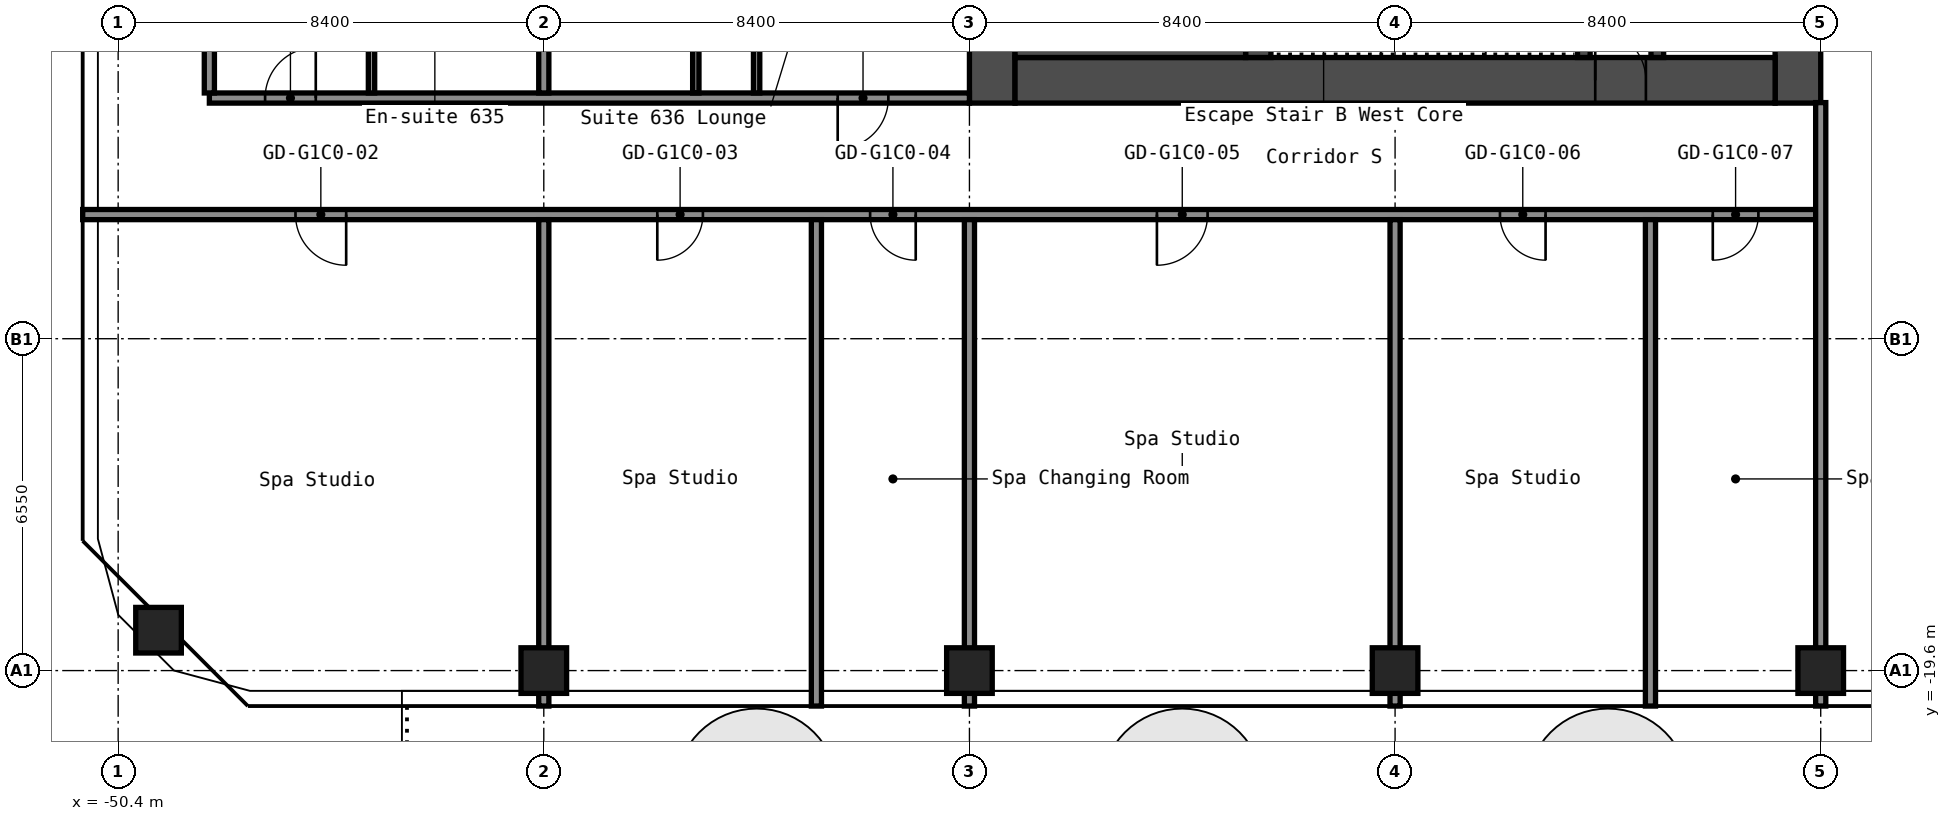
"""IFC4 building model, lengths in metres.
Left out: names, types, materials, properties, quantities, classifications, styles, units other than length and angle.
Written with IfcOpenShell. Run it as: python <this file> out.ifc"""

import sys

from ifc_helpers import new_model, si_unit, direction, frame, frame_2d, origin, origin_2d, place, context, subcontext, project, spatial, rectangle, hollow_rectangle, extrude, element, fill, save


model = new_model("IFC4")
c1 = context("Model", 3, precision=1e-05, world=origin(), true_north=direction((0.0, 1.0)))
c2 = subcontext(c1, "Body", "Model", "MODEL_VIEW")
j1 = project(units=[si_unit("LENGTHUNIT", "METRE"), si_unit("PLANEANGLEUNIT", "RADIAN")], contexts=[c1])
p1 = place(None, origin())
s1 = spatial("IfcSite", under=j1, at=p1, CompositionType="ELEMENT")
p2 = place(p1, origin())
s2 = spatial("IfcBuilding", under=s1, at=p2, CompositionType="ELEMENT")
p3 = place(p2, frame((0.0, 0.0, 26.2)))
s3 = spatial("IfcBuildingStorey", under=s2, at=p3, CompositionType="ELEMENT", Elevation=26.2)
for number, where, z_axis, x_axis in (
    (1, (-49.603, -18.803, 0.0), (0.0, 0.0, 1.0), (1.0, 0.0, 0.0)),
    (2, (-42.0, -19.6, 0.0), (0.0, 0.0, 1.0), (1.0, 0.0, 0.0)),
    (3, (-33.6, -19.6, 0.0), (0.0, 0.0, 1.0), (1.0, 0.0, 0.0)),
    (4, (-25.2, -19.6, 0.0), (0.0, 0.0, 1.0), (1.0, 0.0, 0.0)),
    (5, (-16.8, -19.6, 0.0), (0.0, 0.0, 1.0), (1.0, 0.0, 0.0)),
):
    element("IfcColumn", number, at=place(p3, frame(where, z_axis=z_axis, x_axis=x_axis)), inside=s3, PredefinedType="COLUMN", context=c2, shape_type="SweptSolid", body=[
        extrude(hollow_rectangle(XDim=0.9, YDim=0.9, WallThickness=0.036, at=origin_2d()), origin(), (0.0, 0.0, 1.0), 2.8),
    ])
p4 = place(p3, frame((-17.25, -8.4, 0.0), z_axis=(0.0, 0.0, 1.0), x_axis=(0.0, 1.0, 0.0)))
e6 = element("IfcWall", 6, at=p4, inside=s3, PredefinedType="SHEAR", context=c2, shape_type="SweptSolid", body=[
    extrude(rectangle(XDim=16.8, YDim=0.9, at=frame_2d((8.4, 0.0))), origin(), (0.0, 0.0, 1.0), 2.8),
])
p5 = place(p4, frame((12.75, 0.0, 0.0)))
e7 = element("IfcOpeningElement", 7, at=p5, cuts=e6, PredefinedType="OPENING", context=c2, shape_type="SweptSolid", body=[
    extrude(rectangle(XDim=1.2, YDim=2.1, at=frame_2d((0.6, 1.05))), frame((0.0, 0.46, 0.0), z_axis=(0.0, -1.0, 0.0), x_axis=(1.0, 0.0, 0.0)), (0.0, 0.0, 1.0), 0.92),
])
p6 = place(p4, frame((2.85, 0.0, 0.0)))
e8 = element("IfcOpeningElement", 8, at=p6, cuts=e6, PredefinedType="OPENING", context=c2, shape_type="SweptSolid", body=[
    extrude(rectangle(XDim=1.2, YDim=2.1, at=frame_2d((0.6, 1.05))), frame((0.0, 0.46, 0.0), z_axis=(0.0, -1.0, 0.0), x_axis=(1.0, 0.0, 0.0)), (0.0, 0.0, 1.0), 0.92),
])
p7 = place(p3, frame((-33.15, -8.4, 0.0), z_axis=(0.0, 0.0, 1.0), x_axis=(0.0, 1.0, 0.0)))
e9 = element("IfcWall", 9, at=p7, inside=s3, PredefinedType="SHEAR", context=c2, shape_type="SweptSolid", body=[
    extrude(rectangle(XDim=16.8, YDim=0.9, at=frame_2d((8.4, 0.0))), origin(), (0.0, 0.0, 1.0), 2.8),
])
p8 = place(p3, frame((-32.7, -7.95, 0.0), z_axis=(0.0, 0.0, 1.0), x_axis=(1.0, 0.0, 0.0)))
e10 = element("IfcWall", 10, at=p8, inside=s3, PredefinedType="SHEAR", context=c2, shape_type="SweptSolid", body=[
    extrude(rectangle(XDim=15.0, YDim=0.9, at=frame_2d((7.5, 0.0))), origin(), (0.0, 0.0, 1.0), 2.8),
])
p9 = place(p8, frame((11.45, 0.0, 0.0)))
e11 = element("IfcOpeningElement", 11, at=p9, cuts=e10, PredefinedType="OPENING", context=c2, shape_type="SweptSolid", body=[
    extrude(rectangle(XDim=1.0, YDim=2.1, at=frame_2d((0.5, 1.05))), frame((0.0, 0.46, 0.0), z_axis=(0.0, -1.0, 0.0), x_axis=(1.0, 0.0, 0.0)), (0.0, 0.0, 1.0), 0.92),
])
p10 = place(p3, frame((-20.025, -7.5, 0.0), z_axis=(0.0, 0.0, 1.0), x_axis=(0.0, 1.0, 0.0)))
e12 = element("IfcWall", 12, at=p10, inside=s3, PredefinedType="SHEAR", context=c2, shape_type="SweptSolid", body=[
    extrude(rectangle(XDim=6.3, YDim=0.25, at=frame_2d((3.15, 0.0))), origin(), (0.0, 0.0, 1.0), 2.8),
])
p11 = place(p10, frame((2.4, 0.0, 0.0)))
e13 = element("IfcOpeningElement", 13, at=p11, cuts=e12, PredefinedType="OPENING", context=c2, shape_type="SweptSolid", body=[
    extrude(rectangle(XDim=1.0, YDim=2.1, at=frame_2d((0.5, 1.05))), frame((0.0, 0.135, 0.0), z_axis=(0.0, -1.0, 0.0), x_axis=(1.0, 0.0, 0.0)), (0.0, 0.0, 1.0), 0.27),
])
p12 = place(p3, frame((-21.475, -7.5, 0.0), z_axis=(0.0, 0.0, 1.0), x_axis=(0.0, 1.0, 0.0)))
e14 = element("IfcWall", 14, at=p12, inside=s3, PredefinedType="SHEAR", context=c2, shape_type="SweptSolid", body=[
    extrude(rectangle(XDim=3.75, YDim=0.25, at=frame_2d((1.875, 0.0))), origin(), (0.0, 0.0, 1.0), 2.8),
])
p13 = place(p12, frame((1.3, 0.0, 0.0)))
e15 = element("IfcOpeningElement", 15, at=p13, cuts=e14, PredefinedType="OPENING", context=c2, shape_type="SweptSolid", body=[
    extrude(rectangle(XDim=1.2, YDim=2.1, at=frame_2d((0.6, 1.05))), frame((0.0, 0.135, 0.0), z_axis=(0.0, -1.0, 0.0), x_axis=(1.0, 0.0, 0.0)), (0.0, 0.0, 1.0), 0.27),
])
p14 = place(p3, frame((-27.9, -7.5, 0.0), z_axis=(0.0, 0.0, 1.0), x_axis=(0.0, 1.0, 0.0)))
e16 = element("IfcWall", 16, at=p14, inside=s3, PredefinedType="SHEAR", context=c2, shape_type="SweptSolid", body=[
    extrude(rectangle(XDim=3.75, YDim=0.5, at=frame_2d((1.875, 0.0))), origin(), (0.0, 0.0, 1.0), 2.8),
])
p15 = place(p3, frame((-32.7, -6.75, 0.0), z_axis=(0.0, 0.0, 1.0), x_axis=(1.0, 0.0, 0.0)))
e17 = element("IfcWall", 17, at=p15, inside=s3, PredefinedType="SHEAR", context=c2, shape_type="SweptSolid", body=[
    extrude(rectangle(XDim=4.55, YDim=1.5, at=frame_2d((2.275, 0.0))), origin(), (0.0, 0.0, 1.0), 2.8),
])
p16 = place(p3, frame((-51.1, -10.6, 0.0), z_axis=(0.0, 0.0, 1.0), x_axis=(1.0, 0.0, 0.0)))
e18 = element("IfcWall", 18, at=p16, inside=s3, PredefinedType="PARTITIONING", context=c2, shape_type="SweptSolid", body=[
    extrude(rectangle(XDim=34.3, YDim=0.2, at=frame_2d((17.15, 0.0))), origin(), (0.0, 0.0, 1.0), 2.8),
])
p17 = place(p16, frame((4.2, 0.0, 0.0)))
e19 = element("IfcOpeningElement", 19, at=p17, cuts=e18, PredefinedType="OPENING", context=c2, shape_type="SweptSolid", body=[
    extrude(rectangle(XDim=1.0, YDim=2.1, at=frame_2d((0.5, 1.05))), frame((0.0, 0.11, 0.0), z_axis=(0.0, -1.0, 0.0), x_axis=(1.0, 0.0, 0.0)), (0.0, 0.0, 1.0), 0.22),
])
p18 = place(p16, frame((11.34, 0.0, 0.0)))
e20 = element("IfcOpeningElement", 20, at=p18, cuts=e18, PredefinedType="OPENING", context=c2, shape_type="SweptSolid", body=[
    extrude(rectangle(XDim=0.9, YDim=2.1, at=frame_2d((0.45, 1.05))), frame((0.0, 0.11, 0.0), z_axis=(0.0, -1.0, 0.0), x_axis=(1.0, 0.0, 0.0)), (0.0, 0.0, 1.0), 0.22),
])
p19 = place(p16, frame((15.54, 0.0, 0.0)))
e21 = element("IfcOpeningElement", 21, at=p19, cuts=e18, PredefinedType="OPENING", context=c2, shape_type="SweptSolid", body=[
    extrude(rectangle(XDim=0.9, YDim=2.1, at=frame_2d((0.45, 1.05))), frame((0.0, 0.11, 0.0), z_axis=(0.0, -1.0, 0.0), x_axis=(1.0, 0.0, 0.0)), (0.0, 0.0, 1.0), 0.22),
])
p20 = place(p16, frame((21.2, 0.0, 0.0)))
e22 = element("IfcOpeningElement", 22, at=p20, cuts=e18, PredefinedType="OPENING", context=c2, shape_type="SweptSolid", body=[
    extrude(rectangle(XDim=1.0, YDim=2.1, at=frame_2d((0.5, 1.05))), frame((0.0, 0.11, 0.0), z_axis=(0.0, -1.0, 0.0), x_axis=(1.0, 0.0, 0.0)), (0.0, 0.0, 1.0), 0.22),
])
p21 = place(p16, frame((27.97, 0.0, 0.0)))
e23 = element("IfcOpeningElement", 23, at=p21, cuts=e18, PredefinedType="OPENING", context=c2, shape_type="SweptSolid", body=[
    extrude(rectangle(XDim=0.9, YDim=2.1, at=frame_2d((0.45, 1.05))), frame((0.0, 0.11, 0.0), z_axis=(0.0, -1.0, 0.0), x_axis=(1.0, 0.0, 0.0)), (0.0, 0.0, 1.0), 0.22),
])
p22 = place(p16, frame((32.17, 0.0, 0.0)))
e24 = element("IfcOpeningElement", 24, at=p22, cuts=e18, PredefinedType="OPENING", context=c2, shape_type="SweptSolid", body=[
    extrude(rectangle(XDim=0.9, YDim=2.1, at=frame_2d((0.45, 1.05))), frame((0.0, 0.11, 0.0), z_axis=(0.0, -1.0, 0.0), x_axis=(1.0, 0.0, 0.0)), (0.0, 0.0, 1.0), 0.22),
])
p23 = place(p3, frame((-48.6, -8.3, 0.0), z_axis=(0.0, 0.0, 1.0), x_axis=(1.0, 0.0, 0.0)))
e25 = element("IfcWall", 25, at=p23, inside=s3, PredefinedType="PARTITIONING", context=c2, shape_type="SweptSolid", body=[
    extrude(rectangle(XDim=15.0, YDim=0.2, at=frame_2d((7.5, 0.0))), origin(), (0.0, 0.0, 1.0), 2.8),
])
p24 = place(p23, frame((1.1, 0.0, 0.0)))
e26 = element("IfcOpeningElement", 26, at=p24, cuts=e25, PredefinedType="OPENING", context=c2, shape_type="SweptSolid", body=[
    extrude(rectangle(XDim=1.0, YDim=2.1, at=frame_2d((0.5, 1.05))), frame((0.0, 0.11, 0.0), z_axis=(0.0, -1.0, 0.0), x_axis=(1.0, 0.0, 0.0)), (0.0, 0.0, 1.0), 0.22),
])
p25 = place(p23, frame((12.4, 0.0, 0.0)))
e27 = element("IfcOpeningElement", 27, at=p25, cuts=e25, PredefinedType="OPENING", context=c2, shape_type="SweptSolid", body=[
    extrude(rectangle(XDim=1.0, YDim=2.1, at=frame_2d((0.5, 1.05))), frame((0.0, 0.11, 0.0), z_axis=(0.0, -1.0, 0.0), x_axis=(1.0, 0.0, 0.0)), (0.0, 0.0, 1.0), 0.22),
])
p26 = place(p3, frame((-48.6, -8.2, 0.0), z_axis=(0.0, 0.0, 1.0), x_axis=(0.0, 1.0, 0.0)))
e28 = element("IfcWall", 28, at=p26, inside=s3, PredefinedType="PARTITIONING", context=c2, shape_type="SweptSolid", body=[
    extrude(rectangle(XDim=16.4, YDim=0.2, at=frame_2d((8.2, 0.0))), origin(), (0.0, 0.0, 1.0), 2.8),
])
p27 = place(p3, frame((-45.4, -8.2, 0.0), z_axis=(0.0, 0.0, 1.0), x_axis=(0.0, 1.0, 0.0)))
e29 = element("IfcWall", 29, at=p27, inside=s3, PredefinedType="PARTITIONING", context=c2, shape_type="SweptSolid", body=[
    extrude(rectangle(XDim=3.3, YDim=0.125, at=frame_2d((1.65, 0.0))), origin(), (0.0, 0.0, 1.0), 2.8),
])
p28 = place(p3, frame((-42.0, -20.3, 0.0), z_axis=(0.0, 0.0, 1.0), x_axis=(0.0, 1.0, 0.0)))
e30 = element("IfcWall", 30, at=p28, inside=s3, PredefinedType="PARTITIONING", context=c2, shape_type="SweptSolid", body=[
    extrude(rectangle(XDim=9.6, YDim=0.2, at=frame_2d((4.8, 0.0))), origin(), (0.0, 0.0, 1.0), 2.8),
])
p29 = place(p3, frame((-42.0, -8.2, 0.0), z_axis=(0.0, 0.0, 1.0), x_axis=(0.0, 1.0, 0.0)))
e31 = element("IfcWall", 31, at=p29, inside=s3, PredefinedType="PARTITIONING", context=c2, shape_type="SweptSolid", body=[
    extrude(rectangle(XDim=16.4, YDim=0.2, at=frame_2d((8.2, 0.0))), origin(), (0.0, 0.0, 1.0), 2.8),
])
p30 = place(p3, frame((-39.0, -8.2, 0.0), z_axis=(0.0, 0.0, 1.0), x_axis=(0.0, 1.0, 0.0)))
e32 = element("IfcWall", 32, at=p30, inside=s3, PredefinedType="PARTITIONING", context=c2, shape_type="SweptSolid", body=[
    extrude(rectangle(XDim=3.1, YDim=0.125, at=frame_2d((1.55, 0.0))), origin(), (0.0, 0.0, 1.0), 2.8),
])
p31 = place(p3, frame((-37.8, -8.2, 0.0), z_axis=(0.0, 0.0, 1.0), x_axis=(0.0, 1.0, 0.0)))
e33 = element("IfcWall", 33, at=p31, inside=s3, PredefinedType="PARTITIONING", context=c2, shape_type="SweptSolid", body=[
    extrude(rectangle(XDim=8.1, YDim=0.125, at=frame_2d((4.05, 0.0))), origin(), (0.0, 0.0, 1.0), 2.8),
])
p32 = place(p31, frame((4.05, 0.0, 0.0)))
e34 = element("IfcOpeningElement", 34, at=p32, cuts=e33, PredefinedType="OPENING", context=c2, shape_type="SweptSolid", body=[
    extrude(rectangle(XDim=0.9, YDim=2.1, at=frame_2d((0.45, 1.05))), frame((0.0, 0.073, 0.0), z_axis=(0.0, -1.0, 0.0), x_axis=(1.0, 0.0, 0.0)), (0.0, 0.0, 1.0), 0.145),
])
for number, where, z_axis, x_axis in (
    (35, (-36.62, -20.3, 0.0), (0.0, 0.0, 1.0), (0.0, 1.0, 0.0)),
    (36, (-33.6, -20.3, 0.0), (0.0, 0.0, 1.0), (0.0, 1.0, 0.0)),
    (37, (-25.2, -20.3, 0.0), (0.0, 0.0, 1.0), (0.0, 1.0, 0.0)),
    (38, (-20.16, -20.3, 0.0), (0.0, 0.0, 1.0), (0.0, 1.0, 0.0)),
):
    element("IfcWall", number, at=place(p3, frame(where, z_axis=z_axis, x_axis=x_axis)), inside=s3, PredefinedType="PARTITIONING", context=c2, shape_type="SweptSolid", body=[
        extrude(rectangle(XDim=9.6, YDim=0.2, at=frame_2d((4.8, 0.0))), origin(), (0.0, 0.0, 1.0), 2.8),
    ])
p33 = place(p3, frame((-16.8, -20.3, 0.0), z_axis=(0.0, 0.0, 1.0), x_axis=(0.0, 1.0, 0.0)))
e39 = element("IfcWall", 39, at=p33, inside=s3, PredefinedType="PARTITIONING", context=c2, shape_type="SweptSolid", body=[
    extrude(rectangle(XDim=11.91, YDim=0.2, at=frame_2d((5.955, 0.0))), origin(), (0.0, 0.0, 1.0), 2.8),
])
p34 = place(p9, origin())
e40 = element("IfcDoor", 40, at=p34, inside=s3, OperationType="SINGLE_SWING_RIGHT", PredefinedType="DOOR", context=c2, shape_type="SweptSolid", body=[
    extrude(rectangle(XDim=1.0, YDim=2.1, at=frame_2d((0.5, 1.05))), frame((0.0, 0.025, 0.0), z_axis=(0.0, -1.0, 0.0), x_axis=(1.0, 0.0, 0.0)), (0.0, 0.0, 1.0), 0.05),
])
fill(e11, e40)
p35 = place(p17, origin())
e41 = element("IfcDoor", 41, at=p35, inside=s3, OperationType="SINGLE_SWING_RIGHT", PredefinedType="DOOR", context=c2, shape_type="SweptSolid", body=[
    extrude(rectangle(XDim=1.0, YDim=2.1, at=frame_2d((0.5, 1.05))), frame((0.0, 0.025, 0.0), z_axis=(0.0, -1.0, 0.0), x_axis=(1.0, 0.0, 0.0)), (0.0, 0.0, 1.0), 0.05),
])
fill(e19, e41)
p36 = place(p18, origin())
e42 = element("IfcDoor", 42, at=p36, inside=s3, OperationType="SINGLE_SWING_LEFT", PredefinedType="DOOR", context=c2, shape_type="SweptSolid", body=[
    extrude(rectangle(XDim=0.9, YDim=2.1, at=frame_2d((0.45, 1.05))), frame((0.0, 0.025, 0.0), z_axis=(0.0, -1.0, 0.0), x_axis=(1.0, 0.0, 0.0)), (0.0, 0.0, 1.0), 0.05),
])
fill(e20, e42)
p37 = place(p19, origin())
e43 = element("IfcDoor", 43, at=p37, inside=s3, OperationType="SINGLE_SWING_RIGHT", PredefinedType="DOOR", context=c2, shape_type="SweptSolid", body=[
    extrude(rectangle(XDim=0.9, YDim=2.1, at=frame_2d((0.45, 1.05))), frame((0.0, 0.025, 0.0), z_axis=(0.0, -1.0, 0.0), x_axis=(1.0, 0.0, 0.0)), (0.0, 0.0, 1.0), 0.05),
])
fill(e21, e43)
p38 = place(p20, origin())
e44 = element("IfcDoor", 44, at=p38, inside=s3, OperationType="SINGLE_SWING_LEFT", PredefinedType="DOOR", context=c2, shape_type="SweptSolid", body=[
    extrude(rectangle(XDim=1.0, YDim=2.1, at=frame_2d((0.5, 1.05))), frame((0.0, 0.025, 0.0), z_axis=(0.0, -1.0, 0.0), x_axis=(1.0, 0.0, 0.0)), (0.0, 0.0, 1.0), 0.05),
])
fill(e22, e44)
p39 = place(p21, origin())
e45 = element("IfcDoor", 45, at=p39, inside=s3, OperationType="SINGLE_SWING_RIGHT", PredefinedType="DOOR", context=c2, shape_type="SweptSolid", body=[
    extrude(rectangle(XDim=0.9, YDim=2.1, at=frame_2d((0.45, 1.05))), frame((0.0, 0.025, 0.0), z_axis=(0.0, -1.0, 0.0), x_axis=(1.0, 0.0, 0.0)), (0.0, 0.0, 1.0), 0.05),
])
fill(e23, e45)
p40 = place(p22, origin())
e46 = element("IfcDoor", 46, at=p40, inside=s3, OperationType="SINGLE_SWING_LEFT", PredefinedType="DOOR", context=c2, shape_type="SweptSolid", body=[
    extrude(rectangle(XDim=0.9, YDim=2.1, at=frame_2d((0.45, 1.05))), frame((0.0, 0.025, 0.0), z_axis=(0.0, -1.0, 0.0), x_axis=(1.0, 0.0, 0.0)), (0.0, 0.0, 1.0), 0.05),
])
fill(e24, e46)
p41 = place(p24, origin())
e47 = element("IfcDoor", 47, at=p41, inside=s3, OperationType="SINGLE_SWING_LEFT", PredefinedType="DOOR", context=c2, shape_type="SweptSolid", body=[
    extrude(rectangle(XDim=1.0, YDim=2.1, at=frame_2d((0.5, 1.05))), frame((0.0, 0.025, 0.0), z_axis=(0.0, -1.0, 0.0), x_axis=(1.0, 0.0, 0.0)), (0.0, 0.0, 1.0), 0.05),
])
fill(e26, e47)
p42 = place(p25, origin())
e48 = element("IfcDoor", 48, at=p42, inside=s3, OperationType="SINGLE_SWING_LEFT", PredefinedType="DOOR", context=c2, shape_type="SweptSolid", body=[
    extrude(rectangle(XDim=1.0, YDim=2.1, at=frame_2d((0.5, 1.05))), frame((0.0, 0.025, 0.0), z_axis=(0.0, -1.0, 0.0), x_axis=(1.0, 0.0, 0.0)), (0.0, 0.0, 1.0), 0.05),
])
fill(e27, e48)
save(model, sys.argv[1])
